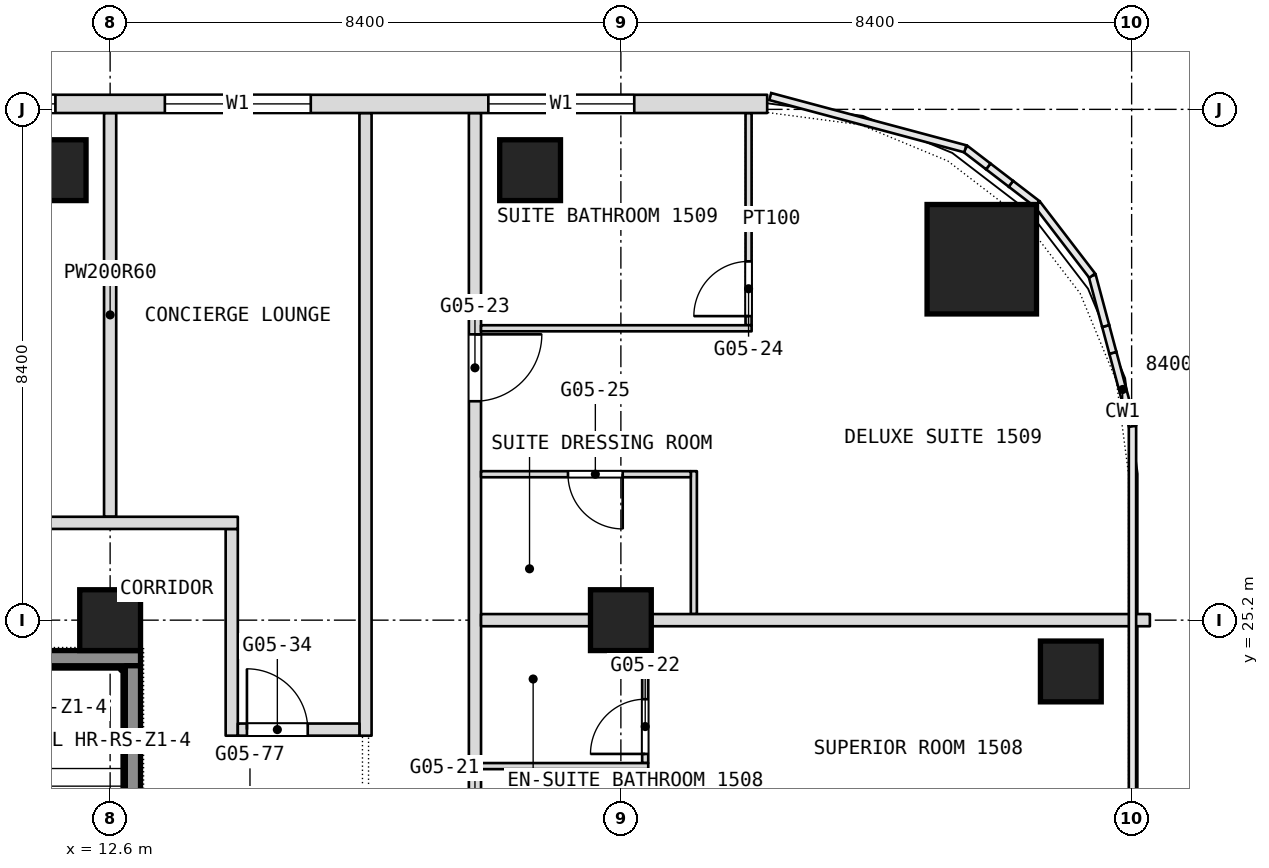
"""IFC4 building model, lengths in metres.
Left out: names, types, materials, properties, quantities, classifications, styles, units other than length and angle.
Written with IfcOpenShell. Run it as: python <this file> out.ifc"""

import sys

from ifc_helpers import new_model, si_unit, direction, frame, frame_2d, origin, origin_2d, place, context, subcontext, project, spatial, rectangle, extrude, element, fill, save


model = new_model("IFC4")
c1 = context("Model", 3, precision=1e-05, world=origin(), true_north=direction((0.0, 1.0)))
c2 = subcontext(c1, "Body", "Model", "MODEL_VIEW")
j1 = project(units=[si_unit("LENGTHUNIT", "METRE"), si_unit("PLANEANGLEUNIT", "RADIAN")], contexts=[c1])
p1 = place(None, origin())
s1 = spatial("IfcSite", under=j1, at=p1, CompositionType="ELEMENT")
p2 = place(p1, origin())
s2 = spatial("IfcBuilding", under=s1, at=p2, CompositionType="ELEMENT")
p3 = place(p2, frame((0.0, 0.0, 68.9)))
s3 = spatial("IfcBuildingStorey", under=s2, at=p3, CompositionType="ELEMENT", Elevation=68.9)
p4 = place(p3, frame((26.936, 31.135, 0.0), z_axis=(0.0, 0.0, 1.0), x_axis=(1.0, 0.0, 0.0)))
e1 = element("IfcColumn", 1, at=p4, inside=s3, PredefinedType="COLUMN", context=c2, shape_type="SweptSolid", body=[
    extrude(rectangle(XDim=1.8, YDim=1.8, at=origin_2d()), origin(), (0.0, 0.0, 1.0), 3.6),
])
for number, where, z_axis, x_axis in (
    (2, (12.6, 25.2, 0.0), (0.0, 0.0, 1.0), (1.0, 0.0, 0.0)),
    (3, (21.0, 25.2, 0.0), (0.0, 0.0, 1.0), (1.0, 0.0, 0.0)),
    (4, (11.704, 32.6, 0.0), (0.0, 0.0, 1.0), (1.0, 0.0, 0.0)),
    (5, (19.507, 32.6, 0.0), (0.0, 0.0, 1.0), (1.0, 0.0, 0.0)),
    (6, (28.4, 24.356, 0.0), (0.0, 0.0, 1.0), (1.0, 0.0, 0.0)),
):
    element("IfcColumn", number, at=place(p3, frame(where, z_axis=z_axis, x_axis=x_axis)), inside=s3, PredefinedType="COLUMN", context=c2, shape_type="SweptSolid", body=[
        extrude(rectangle(XDim=1.0, YDim=1.0, at=origin_2d()), origin(), (0.0, 0.0, 1.0), 3.6),
    ])
p5 = place(p3, frame((23.1, 30.05, 0.0), z_axis=(0.0, 0.0, 1.0), x_axis=(0.0, 1.0, 0.0)))
e7 = element("IfcWall", 7, at=p5, inside=s3, PredefinedType="PARTITIONING", context=c2, shape_type="SweptSolid", body=[
    extrude(rectangle(XDim=3.49, YDim=0.1, at=frame_2d((1.745, 0.0))), origin(), (0.0, 0.0, 1.0), 3.34),
])
p6 = place(p5, frame((0.15, 0.0, 0.0)))
e8 = element("IfcOpeningElement", 8, at=p6, cuts=e7, PredefinedType="OPENING", context=c2, shape_type="SweptSolid", body=[
    extrude(rectangle(XDim=0.9, YDim=2.1, at=frame_2d((0.45, 1.05))), frame((0.0, 0.05, 0.0), z_axis=(0.0, -1.0, 0.0), x_axis=(1.0, 0.0, 0.0)), (0.0, 0.0, 1.0), 0.1),
])
p7 = place(p3, frame((22.2, 25.3, 0.0), z_axis=(0.0, 0.0, 1.0), x_axis=(0.0, 1.0, 0.0)))
e9 = element("IfcWall", 9, at=p7, inside=s3, PredefinedType="PARTITIONING", context=c2, shape_type="SweptSolid", body=[
    extrude(rectangle(XDim=2.35, YDim=0.1, at=frame_2d((1.175, 0.0))), origin(), (0.0, 0.0, 1.0), 3.34),
])
p8 = place(p3, frame((21.4, 22.85, 0.0), z_axis=(0.0, 0.0, 1.0), x_axis=(0.0, 1.0, 0.0)))
e10 = element("IfcWall", 10, at=p8, inside=s3, PredefinedType="PARTITIONING", context=c2, shape_type="SweptSolid", body=[
    extrude(rectangle(XDim=2.45, YDim=0.1, at=frame_2d((1.225, 0.0))), origin(), (0.0, 0.0, 1.0), 3.34),
])
p9 = place(p8, frame((0.15, 0.0, 0.0)))
e11 = element("IfcOpeningElement", 11, at=p9, cuts=e10, PredefinedType="OPENING", context=c2, shape_type="SweptSolid", body=[
    extrude(rectangle(XDim=0.9, YDim=2.1, at=frame_2d((0.45, 1.05))), frame((0.0, 0.05, 0.0), z_axis=(0.0, -1.0, 0.0), x_axis=(1.0, 0.0, 0.0)), (0.0, 0.0, 1.0), 0.1),
])
p10 = place(p3, frame((18.6, -16.665, 0.0), z_axis=(0.0, 0.0, 1.0), x_axis=(0.0, 1.0, 0.0)))
e12 = element("IfcWall", 12, at=p10, inside=s3, PredefinedType="PARTITIONING", context=c2, shape_type="SweptSolid", body=[
    extrude(rectangle(XDim=50.205, YDim=0.2, at=frame_2d((25.103, 0.0))), origin(), (0.0, 0.0, 1.0), 3.34),
])
p11 = place(p10, frame((2.991, 0.0, 0.0)))
e13 = element("IfcOpeningElement", 13, at=p11, cuts=e12, PredefinedType="OPENING", context=c2, shape_type="SweptSolid", body=[
    extrude(rectangle(XDim=1.0, YDim=2.1, at=frame_2d((0.5, 1.05))), frame((0.0, 0.1, 0.0), z_axis=(0.0, -1.0, 0.0), x_axis=(1.0, 0.0, 0.0)), (0.0, 0.0, 1.0), 0.2),
])
p12 = place(p10, frame((4.574, 0.0, 0.0)))
e14 = element("IfcOpeningElement", 14, at=p12, cuts=e12, PredefinedType="OPENING", context=c2, shape_type="SweptSolid", body=[
    extrude(rectangle(XDim=1.0, YDim=2.1, at=frame_2d((0.5, 1.05))), frame((0.0, 0.1, 0.0), z_axis=(0.0, -1.0, 0.0), x_axis=(1.0, 0.0, 0.0)), (0.0, 0.0, 1.0), 0.2),
])
p13 = place(p10, frame((11.865, 0.0, 0.0)))
e15 = element("IfcOpeningElement", 15, at=p13, cuts=e12, PredefinedType="OPENING", context=c2, shape_type="SweptSolid", body=[
    extrude(rectangle(XDim=1.1, YDim=2.1, at=frame_2d((0.55, 1.05))), frame((0.0, 0.1, 0.0), z_axis=(0.0, -1.0, 0.0), x_axis=(1.0, 0.0, 0.0)), (0.0, 0.0, 1.0), 0.2),
])
p14 = place(p10, frame((20.365, 0.0, 0.0)))
e16 = element("IfcOpeningElement", 16, at=p14, cuts=e12, PredefinedType="OPENING", context=c2, shape_type="SweptSolid", body=[
    extrude(rectangle(XDim=1.1, YDim=2.1, at=frame_2d((0.55, 1.05))), frame((0.0, 0.1, 0.0), z_axis=(0.0, -1.0, 0.0), x_axis=(1.0, 0.0, 0.0)), (0.0, 0.0, 1.0), 0.2),
])
p15 = place(p10, frame((25.465, 0.0, 0.0)))
e17 = element("IfcOpeningElement", 17, at=p15, cuts=e12, PredefinedType="OPENING", context=c2, shape_type="SweptSolid", body=[
    extrude(rectangle(XDim=1.0, YDim=2.1, at=frame_2d((0.5, 1.05))), frame((0.0, 0.1, 0.0), z_axis=(0.0, -1.0, 0.0), x_axis=(1.0, 0.0, 0.0)), (0.0, 0.0, 1.0), 0.2),
])
p16 = place(p10, frame((32.065, 0.0, 0.0)))
e18 = element("IfcOpeningElement", 18, at=p16, cuts=e12, PredefinedType="OPENING", context=c2, shape_type="SweptSolid", body=[
    extrude(rectangle(XDim=1.0, YDim=2.1, at=frame_2d((0.5, 1.05))), frame((0.0, 0.1, 0.0), z_axis=(0.0, -1.0, 0.0), x_axis=(1.0, 0.0, 0.0)), (0.0, 0.0, 1.0), 0.2),
])
p17 = place(p10, frame((36.265, 0.0, 0.0)))
e19 = element("IfcOpeningElement", 19, at=p17, cuts=e12, PredefinedType="OPENING", context=c2, shape_type="SweptSolid", body=[
    extrude(rectangle(XDim=1.0, YDim=2.1, at=frame_2d((0.5, 1.05))), frame((0.0, 0.1, 0.0), z_axis=(0.0, -1.0, 0.0), x_axis=(1.0, 0.0, 0.0)), (0.0, 0.0, 1.0), 0.2),
])
p18 = place(p10, frame((38.065, 0.0, 0.0)))
e20 = element("IfcOpeningElement", 20, at=p18, cuts=e12, PredefinedType="OPENING", context=c2, shape_type="SweptSolid", body=[
    extrude(rectangle(XDim=1.0, YDim=2.1, at=frame_2d((0.5, 1.05))), frame((0.0, 0.1, 0.0), z_axis=(0.0, -1.0, 0.0), x_axis=(1.0, 0.0, 0.0)), (0.0, 0.0, 1.0), 0.2),
])
p19 = place(p10, frame((45.465, 0.0, 0.0)))
e21 = element("IfcOpeningElement", 21, at=p19, cuts=e12, PredefinedType="OPENING", context=c2, shape_type="SweptSolid", body=[
    extrude(rectangle(XDim=1.1, YDim=2.1, at=frame_2d((0.55, 1.05))), frame((0.0, 0.1, 0.0), z_axis=(0.0, -1.0, 0.0), x_axis=(1.0, 0.0, 0.0)), (0.0, 0.0, 1.0), 0.2),
])
p20 = place(p3, frame((16.8, 23.3, 0.0), z_axis=(0.0, 0.0, 1.0), x_axis=(0.0, 1.0, 0.0)))
e22 = element("IfcWall", 22, at=p20, inside=s3, PredefinedType="PARTITIONING", context=c2, shape_type="SweptSolid", body=[
    extrude(rectangle(XDim=10.24, YDim=0.2, at=frame_2d((5.12, 0.0))), origin(), (0.0, 0.0, 1.0), 3.34),
])
p21 = place(p3, frame((14.6, 23.3, 0.0), z_axis=(0.0, 0.0, 1.0), x_axis=(0.0, 1.0, 0.0)))
e23 = element("IfcWall", 23, at=p21, inside=s3, PredefinedType="PARTITIONING", context=c2, shape_type="SweptSolid", body=[
    extrude(rectangle(XDim=3.4, YDim=0.2, at=frame_2d((1.7, 0.0))), origin(), (0.0, 0.0, 1.0), 3.34),
])
p22 = place(p3, frame((12.6, 26.9, 0.0), z_axis=(0.0, 0.0, 1.0), x_axis=(0.0, 1.0, 0.0)))
e24 = element("IfcWall", 24, at=p22, inside=s3, PredefinedType="PARTITIONING", context=c2, shape_type="SweptSolid", body=[
    extrude(rectangle(XDim=6.64, YDim=0.2, at=frame_2d((3.32, 0.0))), origin(), (0.0, 0.0, 1.0), 3.34),
])
p23 = place(p3, frame((18.7, 22.8, 0.0), z_axis=(0.0, 0.0, 1.0), x_axis=(1.0, 0.0, 0.0)))
e25 = element("IfcWall", 25, at=p23, inside=s3, PredefinedType="PARTITIONING", context=c2, shape_type="SweptSolid", body=[
    extrude(rectangle(XDim=2.75, YDim=0.1, at=frame_2d((1.375, 0.0))), origin(), (0.0, 0.0, 1.0), 3.34),
])
p24 = place(p3, frame((14.7, 23.4, 0.0), z_axis=(0.0, 0.0, 1.0), x_axis=(1.0, 0.0, 0.0)))
e26 = element("IfcWall", 26, at=p24, inside=s3, PredefinedType="PARTITIONING", context=c2, shape_type="SweptSolid", body=[
    extrude(rectangle(XDim=2.0, YDim=0.2, at=frame_2d((1.0, 0.0))), origin(), (0.0, 0.0, 1.0), 3.34),
])
p25 = place(p24, frame((0.15, 0.0, 0.0)))
e27 = element("IfcOpeningElement", 27, at=p25, cuts=e26, PredefinedType="OPENING", context=c2, shape_type="SweptSolid", body=[
    extrude(rectangle(XDim=1.0, YDim=2.1, at=frame_2d((0.5, 1.05))), frame((0.0, 0.1, 0.0), z_axis=(0.0, -1.0, 0.0), x_axis=(1.0, 0.0, 0.0)), (0.0, 0.0, 1.0), 0.2),
])
p26 = place(p3, frame((18.7, 25.2, 0.0), z_axis=(0.0, 0.0, 1.0), x_axis=(1.0, 0.0, 0.0)))
e28 = element("IfcWall", 28, at=p26, inside=s3, PredefinedType="PARTITIONING", context=c2, shape_type="SweptSolid", body=[
    extrude(rectangle(XDim=11.0, YDim=0.2, at=frame_2d((5.5, 0.0))), origin(), (0.0, 0.0, 1.0), 2.84),
])
p27 = place(p3, frame((6.7, 26.8, 0.0), z_axis=(0.0, 0.0, 1.0), x_axis=(1.0, 0.0, 0.0)))
e29 = element("IfcWall", 29, at=p27, inside=s3, PredefinedType="PARTITIONING", context=c2, shape_type="SweptSolid", body=[
    extrude(rectangle(XDim=8.0, YDim=0.2, at=frame_2d((4.0, 0.0))), origin(), (0.0, 0.0, 1.0), 3.34),
])
p28 = place(p27, frame((2.5, 0.0, 0.0)))
e30 = element("IfcOpeningElement", 30, at=p28, cuts=e29, PredefinedType="OPENING", context=c2, shape_type="SweptSolid", body=[
    extrude(rectangle(XDim=1.0, YDim=2.1, at=frame_2d((0.5, 1.05))), frame((0.0, 0.1, 0.0), z_axis=(0.0, -1.0, 0.0), x_axis=(1.0, 0.0, 0.0)), (0.0, 0.0, 1.0), 0.2),
])
p29 = place(p3, frame((18.7, 27.6, 0.0), z_axis=(0.0, 0.0, 1.0), x_axis=(1.0, 0.0, 0.0)))
e31 = element("IfcWall", 31, at=p29, inside=s3, PredefinedType="PARTITIONING", context=c2, shape_type="SweptSolid", body=[
    extrude(rectangle(XDim=3.45, YDim=0.1, at=frame_2d((1.725, 0.0))), origin(), (0.0, 0.0, 1.0), 3.34),
])
p30 = place(p29, frame((1.43, 0.0, 0.0)))
e32 = element("IfcOpeningElement", 32, at=p30, cuts=e31, PredefinedType="OPENING", context=c2, shape_type="SweptSolid", body=[
    extrude(rectangle(XDim=0.9, YDim=2.1, at=frame_2d((0.45, 1.05))), frame((0.0, 0.05, 0.0), z_axis=(0.0, -1.0, 0.0), x_axis=(1.0, 0.0, 0.0)), (0.0, 0.0, 1.0), 0.1),
])
p31 = place(p3, frame((18.7, 30.0, 0.0), z_axis=(0.0, 0.0, 1.0), x_axis=(1.0, 0.0, 0.0)))
e33 = element("IfcWall", 33, at=p31, inside=s3, PredefinedType="PARTITIONING", context=c2, shape_type="SweptSolid", body=[
    extrude(rectangle(XDim=4.45, YDim=0.1, at=frame_2d((2.225, 0.0))), origin(), (0.0, 0.0, 1.0), 3.34),
])
p32 = place(p3, frame((23.406, 33.69, 0.0), z_axis=(0.0, 0.0, 1.0), x_axis=(-1.0, 0.0, 0.0)))
e34 = element("IfcWall", 34, at=p32, inside=s3, PredefinedType="NOTDEFINED", context=c2, shape_type="SweptSolid", body=[
    extrude(rectangle(XDim=46.812, YDim=0.3, at=frame_2d((23.406, 0.0))), origin(), (0.0, 0.0, 1.0), 3.6),
])
p33 = place(p32, frame((2.186, 0.0, 0.9)))
e35 = element("IfcOpeningElement", 35, at=p33, cuts=e34, PredefinedType="OPENING", context=c2, shape_type="SweptSolid", body=[
    extrude(rectangle(XDim=2.4, YDim=2.1, at=frame_2d((1.2, 1.05))), frame((0.0, 0.15, 0.0), z_axis=(0.0, -1.0, 0.0), x_axis=(1.0, 0.0, 0.0)), (0.0, 0.0, 1.0), 0.3),
])
p34 = place(p32, frame((7.506, 0.0, 0.9)))
e36 = element("IfcOpeningElement", 36, at=p34, cuts=e34, PredefinedType="OPENING", context=c2, shape_type="SweptSolid", body=[
    extrude(rectangle(XDim=2.4, YDim=2.1, at=frame_2d((1.2, 1.05))), frame((0.0, 0.15, 0.0), z_axis=(0.0, -1.0, 0.0), x_axis=(1.0, 0.0, 0.0)), (0.0, 0.0, 1.0), 0.3),
])
p35 = place(p32, frame((11.706, 0.0, 0.9)))
e37 = element("IfcOpeningElement", 37, at=p35, cuts=e34, PredefinedType="OPENING", context=c2, shape_type="SweptSolid", body=[
    extrude(rectangle(XDim=2.4, YDim=2.1, at=frame_2d((1.2, 1.05))), frame((0.0, 0.15, 0.0), z_axis=(0.0, -1.0, 0.0), x_axis=(1.0, 0.0, 0.0)), (0.0, 0.0, 1.0), 0.3),
])
p36 = place(p32, frame((15.906, 0.0, 0.9)))
e38 = element("IfcOpeningElement", 38, at=p36, cuts=e34, PredefinedType="OPENING", context=c2, shape_type="SweptSolid", body=[
    extrude(rectangle(XDim=2.4, YDim=2.1, at=frame_2d((1.2, 1.05))), frame((0.0, 0.15, 0.0), z_axis=(0.0, -1.0, 0.0), x_axis=(1.0, 0.0, 0.0)), (0.0, 0.0, 1.0), 0.3),
])
p37 = place(p32, frame((20.106, 0.0, 0.9)))
e39 = element("IfcOpeningElement", 39, at=p37, cuts=e34, PredefinedType="OPENING", context=c2, shape_type="SweptSolid", body=[
    extrude(rectangle(XDim=2.4, YDim=2.1, at=frame_2d((1.2, 1.05))), frame((0.0, 0.15, 0.0), z_axis=(0.0, -1.0, 0.0), x_axis=(1.0, 0.0, 0.0)), (0.0, 0.0, 1.0), 0.3),
])
p38 = place(p32, frame((24.306, 0.0, 0.9)))
e40 = element("IfcOpeningElement", 40, at=p38, cuts=e34, PredefinedType="OPENING", context=c2, shape_type="SweptSolid", body=[
    extrude(rectangle(XDim=2.4, YDim=2.1, at=frame_2d((1.2, 1.05))), frame((0.0, 0.15, 0.0), z_axis=(0.0, -1.0, 0.0), x_axis=(1.0, 0.0, 0.0)), (0.0, 0.0, 1.0), 0.3),
])
p39 = place(p32, frame((28.506, 0.0, 0.9)))
e41 = element("IfcOpeningElement", 41, at=p39, cuts=e34, PredefinedType="OPENING", context=c2, shape_type="SweptSolid", body=[
    extrude(rectangle(XDim=2.4, YDim=2.1, at=frame_2d((1.2, 1.05))), frame((0.0, 0.15, 0.0), z_axis=(0.0, -1.0, 0.0), x_axis=(1.0, 0.0, 0.0)), (0.0, 0.0, 1.0), 0.3),
])
p40 = place(p32, frame((32.706, 0.0, 0.9)))
e42 = element("IfcOpeningElement", 42, at=p40, cuts=e34, PredefinedType="OPENING", context=c2, shape_type="SweptSolid", body=[
    extrude(rectangle(XDim=2.4, YDim=2.1, at=frame_2d((1.2, 1.05))), frame((0.0, 0.15, 0.0), z_axis=(0.0, -1.0, 0.0), x_axis=(1.0, 0.0, 0.0)), (0.0, 0.0, 1.0), 0.3),
])
p41 = place(p32, frame((36.906, 0.0, 0.9)))
e43 = element("IfcOpeningElement", 43, at=p41, cuts=e34, PredefinedType="OPENING", context=c2, shape_type="SweptSolid", body=[
    extrude(rectangle(XDim=2.4, YDim=2.1, at=frame_2d((1.2, 1.05))), frame((0.0, 0.15, 0.0), z_axis=(0.0, -1.0, 0.0), x_axis=(1.0, 0.0, 0.0)), (0.0, 0.0, 1.0), 0.3),
])
p42 = place(p32, frame((42.226, 0.0, 0.9)))
e44 = element("IfcOpeningElement", 44, at=p42, cuts=e34, PredefinedType="OPENING", context=c2, shape_type="SweptSolid", body=[
    extrude(rectangle(XDim=2.4, YDim=2.1, at=frame_2d((1.2, 1.05))), frame((0.0, 0.15, 0.0), z_axis=(0.0, -1.0, 0.0), x_axis=(1.0, 0.0, 0.0)), (0.0, 0.0, 1.0), 0.3),
])
p43 = place(p3, frame((9.7, 24.575, 0.1), z_axis=(0.0, 0.0, 1.0), x_axis=(1.0, 0.0, 0.0)))
e45 = element("IfcWall", 45, at=p43, inside=s3, PredefinedType="SHEAR", context=c2, shape_type="SweptSolid", body=[
    extrude(rectangle(XDim=3.4, YDim=0.25, at=frame_2d((1.7, 0.0))), origin(), (0.0, 0.0, 1.0), 3.6),
])
p44 = place(p3, frame((12.975, 18.75, 0.1), z_axis=(0.0, 0.0, 1.0), x_axis=(0.0, 1.0, 0.0)))
e46 = element("IfcWall", 46, at=p44, inside=s3, PredefinedType="SHEAR", context=c2, shape_type="SweptSolid", body=[
    extrude(rectangle(XDim=5.7, YDim=0.25, at=frame_2d((2.85, 0.0))), origin(), (0.0, 0.0, 1.0), 3.6),
])
p45 = place(p6, origin())
e47 = element("IfcDoor", 47, at=p45, inside=s3, OperationType="SINGLE_SWING_LEFT", PredefinedType="DOOR", context=c2, shape_type="SweptSolid", body=[
    extrude(rectangle(XDim=0.9, YDim=2.1, at=frame_2d((0.45, 1.05))), frame((0.0, 0.025, 0.0), z_axis=(0.0, -1.0, 0.0), x_axis=(1.0, 0.0, 0.0)), (0.0, 0.0, 1.0), 0.05),
])
fill(e8, e47)
p46 = place(p9, origin())
e48 = element("IfcDoor", 48, at=p46, inside=s3, OperationType="SINGLE_SWING_LEFT", PredefinedType="DOOR", context=c2, shape_type="SweptSolid", body=[
    extrude(rectangle(XDim=0.9, YDim=2.1, at=frame_2d((0.45, 1.05))), frame((0.0, 0.025, 0.0), z_axis=(0.0, -1.0, 0.0), x_axis=(1.0, 0.0, 0.0)), (0.0, 0.0, 1.0), 0.05),
])
fill(e11, e48)
p47 = place(p19, origin())
e49 = element("IfcDoor", 49, at=p47, inside=s3, OperationType="SINGLE_SWING_LEFT", PredefinedType="DOOR", context=c2, shape_type="SweptSolid", body=[
    extrude(rectangle(XDim=1.1, YDim=2.1, at=frame_2d((0.55, 1.05))), frame((0.0, 0.025, 0.0), z_axis=(0.0, -1.0, 0.0), x_axis=(1.0, 0.0, 0.0)), (0.0, 0.0, 1.0), 0.05),
])
fill(e21, e49)
p48 = place(p25, origin())
e50 = element("IfcDoor", 50, at=p48, inside=s3, OperationType="SINGLE_SWING_LEFT", PredefinedType="DOOR", context=c2, shape_type="SweptSolid", body=[
    extrude(rectangle(XDim=1.0, YDim=2.1, at=frame_2d((0.5, 1.05))), frame((0.0, 0.025, 0.0), z_axis=(0.0, -1.0, 0.0), x_axis=(1.0, 0.0, 0.0)), (0.0, 0.0, 1.0), 0.05),
])
fill(e27, e50)
p49 = place(p30, origin())
e51 = element("IfcDoor", 51, at=p49, inside=s3, OperationType="SINGLE_SWING_LEFT", PredefinedType="DOOR", context=c2, shape_type="SweptSolid", body=[
    extrude(rectangle(XDim=0.9, YDim=2.1, at=frame_2d((0.45, 1.05))), frame((0.0, 0.025, 0.0), z_axis=(0.0, -1.0, 0.0), x_axis=(1.0, 0.0, 0.0)), (0.0, 0.0, 1.0), 0.05),
])
fill(e32, e51)
p50 = place(p33, origin())
e52 = element("IfcWindow", 52, at=p50, inside=s3, PartitioningType="SINGLE_PANEL", PredefinedType="WINDOW", context=c2, shape_type="SweptSolid", body=[
    extrude(rectangle(XDim=2.4, YDim=2.1, at=frame_2d((1.2, 1.05))), frame((0.0, 0.03, 0.0), z_axis=(0.0, -1.0, 0.0), x_axis=(1.0, 0.0, 0.0)), (0.0, 0.0, 1.0), 0.06),
])
fill(e35, e52)
p51 = place(p34, origin())
e53 = element("IfcWindow", 53, at=p51, inside=s3, PartitioningType="SINGLE_PANEL", PredefinedType="WINDOW", context=c2, shape_type="SweptSolid", body=[
    extrude(rectangle(XDim=2.4, YDim=2.1, at=frame_2d((1.2, 1.05))), frame((0.0, 0.03, 0.0), z_axis=(0.0, -1.0, 0.0), x_axis=(1.0, 0.0, 0.0)), (0.0, 0.0, 1.0), 0.06),
])
fill(e36, e53)
p52 = place(p35, origin())
e54 = element("IfcWindow", 54, at=p52, inside=s3, PartitioningType="SINGLE_PANEL", PredefinedType="WINDOW", context=c2, shape_type="SweptSolid", body=[
    extrude(rectangle(XDim=2.4, YDim=2.1, at=frame_2d((1.2, 1.05))), frame((0.0, 0.03, 0.0), z_axis=(0.0, -1.0, 0.0), x_axis=(1.0, 0.0, 0.0)), (0.0, 0.0, 1.0), 0.06),
])
fill(e37, e54)
save(model, sys.argv[1])
